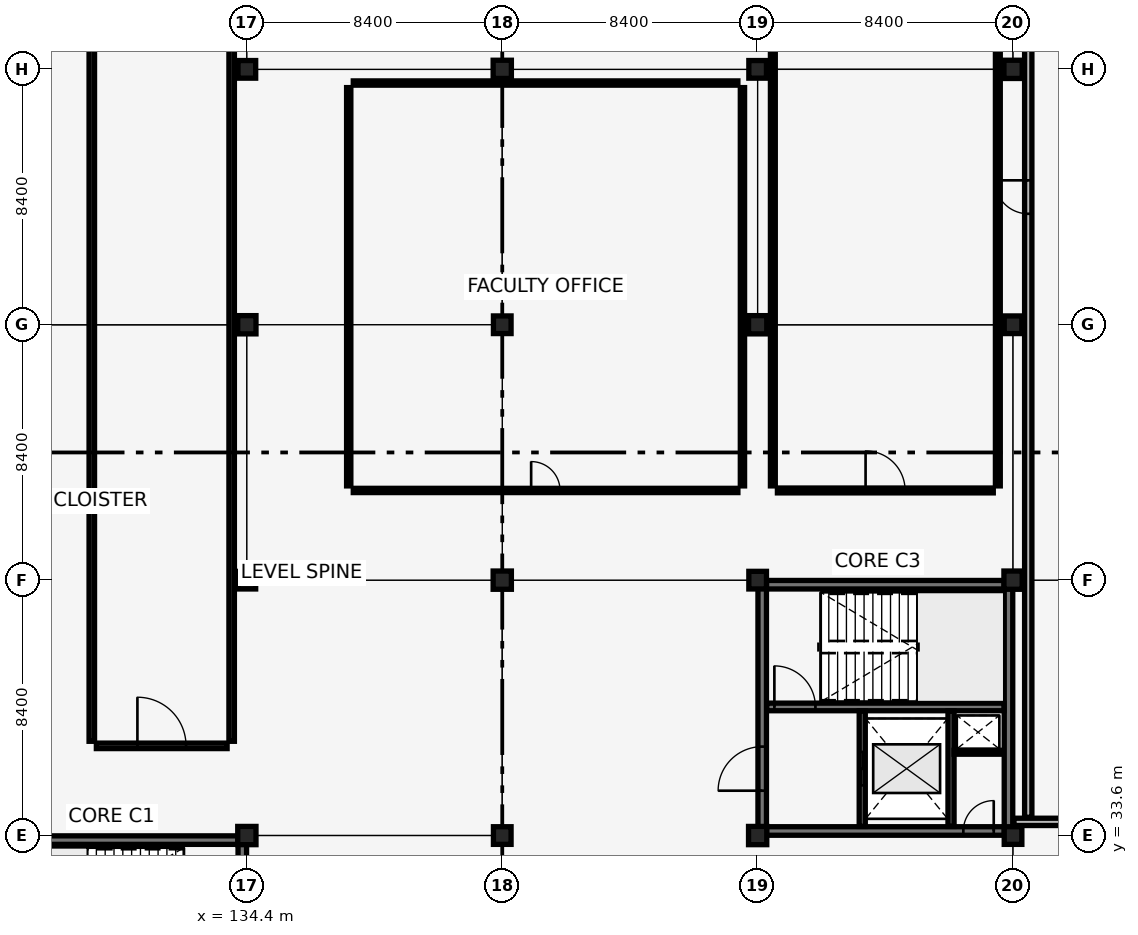
"""IFC4 building model, lengths in metres.
Left out: names, types, materials, properties, quantities, classifications, styles, units other than length and angle.
Written with IfcOpenShell. Run it as: python <this file> out.ifc"""

import sys

from ifc_helpers import new_model, si_unit, direction, frame, frame_2d, origin, origin_2d, place, context, subcontext, project, spatial, rectangle, extrude, element, fill, save


model = new_model("IFC4")
c1 = context("Model", 3, precision=1e-05, world=origin(), true_north=direction((0.0, 1.0)))
c2 = subcontext(c1, "Body", "Model", "MODEL_VIEW")
j1 = project(units=[si_unit("LENGTHUNIT", "METRE"), si_unit("PLANEANGLEUNIT", "RADIAN")], contexts=[c1])
p1 = place(None, origin())
s1 = spatial("IfcSite", under=j1, at=p1, CompositionType="ELEMENT")
p2 = place(p1, origin())
s2 = spatial("IfcBuilding", under=s1, at=p2, CompositionType="ELEMENT")
p3 = place(p2, frame((0.0, 0.0, 18.02)))
s3 = spatial("IfcBuildingStorey", under=s2, at=p3, CompositionType="ELEMENT", Elevation=18.02)
p4 = place(p3, frame((126.15, 33.45, 0.0), z_axis=(0.0, 0.0, 1.0), x_axis=(1.0, 0.0, 0.0)))
e1 = element("IfcWall", 1, at=p4, inside=s3, PredefinedType="SHEAR", context=c2, shape_type="SweptSolid", body=[
    extrude(rectangle(XDim=8.1, YDim=0.28, at=frame_2d((4.05, 0.0))), origin(), (0.0, 0.0, 1.0), 3.78),
])
p5 = place(p3, frame((134.25, 25.35, 0.0), z_axis=(0.0, 0.0, 1.0), x_axis=(0.0, 1.0, 0.0)))
e2 = element("IfcWall", 2, at=p5, inside=s3, PredefinedType="SHEAR", context=c2, shape_type="SweptSolid", body=[
    extrude(rectangle(XDim=8.1, YDim=0.28, at=frame_2d((4.05, 0.0))), origin(), (0.0, 0.0, 1.0), 3.78),
])
p6 = place(p5, frame((1.325, 0.0, 0.0)))
e3 = element("IfcOpeningElement", 3, at=p6, cuts=e2, PredefinedType="OPENING", context=c2, shape_type="SweptSolid", body=[
    extrude(rectangle(XDim=1.45, YDim=2.15, at=frame_2d((0.725, 1.075))), frame((0.0, 0.15, 0.0), z_axis=(0.0, -1.0, 0.0), x_axis=(1.0, 0.0, 0.0)), (0.0, 0.0, 1.0), 0.3),
])
p7 = place(p3, frame((151.35, 33.75, 0.0), z_axis=(0.0, 0.0, 1.0), x_axis=(1.0, 0.0, 0.0)))
e4 = element("IfcWall", 4, at=p7, inside=s3, PredefinedType="SHEAR", context=c2, shape_type="SweptSolid", body=[
    extrude(rectangle(XDim=8.1, YDim=0.28, at=frame_2d((4.05, 0.0))), origin(), (0.0, 0.0, 1.0), 3.78),
])
p8 = place(p7, frame((6.615, 0.0, 0.0)))
e5 = element("IfcOpeningElement", 5, at=p8, cuts=e4, PredefinedType="OPENING", context=c2, shape_type="SweptSolid", body=[
    extrude(rectangle(XDim=1.0, YDim=2.15, at=frame_2d((0.5, 1.075))), frame((0.0, 0.15, 0.0), z_axis=(0.0, -1.0, 0.0), x_axis=(1.0, 0.0, 0.0)), (0.0, 0.0, 1.0), 0.3),
])
p9 = place(p3, frame((151.35, 41.85, 0.0), z_axis=(0.0, 0.0, 1.0), x_axis=(1.0, 0.0, 0.0)))
e6 = element("IfcWall", 6, at=p9, inside=s3, PredefinedType="SHEAR", context=c2, shape_type="SweptSolid", body=[
    extrude(rectangle(XDim=8.1, YDim=0.28, at=frame_2d((4.05, 0.0))), origin(), (0.0, 0.0, 1.0), 3.78),
])
p10 = place(p3, frame((151.35, 33.75, 0.0), z_axis=(0.0, 0.0, 1.0), x_axis=(0.0, 1.0, 0.0)))
e7 = element("IfcWall", 7, at=p10, inside=s3, PredefinedType="SHEAR", context=c2, shape_type="SweptSolid", body=[
    extrude(rectangle(XDim=8.1, YDim=0.28, at=frame_2d((4.05, 0.0))), origin(), (0.0, 0.0, 1.0), 3.78),
])
p11 = place(p10, frame((1.325, 0.0, 0.0)))
e8 = element("IfcOpeningElement", 8, at=p11, cuts=e7, PredefinedType="OPENING", context=c2, shape_type="SweptSolid", body=[
    extrude(rectangle(XDim=1.45, YDim=2.15, at=frame_2d((0.725, 1.075))), frame((0.0, 0.15, 0.0), z_axis=(0.0, -1.0, 0.0), x_axis=(1.0, 0.0, 0.0)), (0.0, 0.0, 1.0), 0.3),
])
p12 = place(p3, frame((159.45, 33.75, 0.0), z_axis=(0.0, 0.0, 1.0), x_axis=(0.0, 1.0, 0.0)))
e9 = element("IfcWall", 9, at=p12, inside=s3, PredefinedType="SHEAR", context=c2, shape_type="SweptSolid", body=[
    extrude(rectangle(XDim=8.1, YDim=0.28, at=frame_2d((4.05, 0.0))), origin(), (0.0, 0.0, 1.0), 3.78),
])
p13 = place(p3, frame((151.5, 37.83, 0.0), z_axis=(0.0, 0.0, 1.0), x_axis=(1.0, 0.0, 0.0)))
e10 = element("IfcWall", 10, at=p13, inside=s3, PredefinedType="SHEAR", context=c2, shape_type="SweptSolid", body=[
    extrude(rectangle(XDim=7.8, YDim=0.25, at=frame_2d((3.9, 0.0))), origin(), (0.0, 0.0, 1.0), 3.78),
])
p14 = place(p13, frame((0.25, 0.0, 0.0)))
e11 = element("IfcOpeningElement", 11, at=p14, cuts=e10, PredefinedType="OPENING", context=c2, shape_type="SweptSolid", body=[
    extrude(rectangle(XDim=1.35, YDim=2.15, at=frame_2d((0.675, 1.075))), frame((0.0, 0.135, 0.0), z_axis=(0.0, -1.0, 0.0), x_axis=(1.0, 0.0, 0.0)), (0.0, 0.0, 1.0), 0.27),
])
p15 = place(p3, frame((134.4, 33.6, 0.0), z_axis=(0.0, 0.0, 1.0), x_axis=(1.0, 0.0, 0.0)))
e12 = element("IfcColumn", 12, at=p15, inside=s3, PredefinedType="COLUMN", context=c2, shape_type="SweptSolid", body=[
    extrude(rectangle(XDim=0.6, YDim=0.6, at=origin_2d()), origin(), (0.0, 0.0, 1.0), 3.78),
])
p16 = place(p3, frame((134.4, 42.0, 0.0), z_axis=(0.0, 0.0, 1.0), x_axis=(1.0, 0.0, 0.0)))
e13 = element("IfcColumn", 13, at=p16, inside=s3, PredefinedType="COLUMN", context=c2, shape_type="SweptSolid", body=[
    extrude(rectangle(XDim=0.58, YDim=0.58, at=origin_2d()), origin(), (0.0, 0.0, 1.0), 3.78),
])
p17 = place(p3, frame((134.4, 50.4, 0.0), z_axis=(0.0, 0.0, 1.0), x_axis=(1.0, 0.0, 0.0)))
e14 = element("IfcColumn", 14, at=p17, inside=s3, PredefinedType="COLUMN", context=c2, shape_type="SweptSolid", body=[
    extrude(rectangle(XDim=0.6, YDim=0.6, at=origin_2d()), origin(), (0.0, 0.0, 1.0), 3.78),
])
for number, where, z_axis, x_axis in (
    (15, (134.4, 58.8, 0.0), (0.0, 0.0, 1.0), (1.0, 0.0, 0.0)),
    (16, (142.8, 33.6, 0.0), (0.0, 0.0, 1.0), (1.0, 0.0, 0.0)),
):
    element("IfcColumn", number, at=place(p3, frame(where, z_axis=z_axis, x_axis=x_axis)), inside=s3, PredefinedType="COLUMN", context=c2, shape_type="SweptSolid", body=[
        extrude(rectangle(XDim=0.58, YDim=0.58, at=origin_2d()), origin(), (0.0, 0.0, 1.0), 3.78),
    ])
p18 = place(p3, frame((142.8, 42.0, 0.0), z_axis=(0.0, 0.0, 1.0), x_axis=(1.0, 0.0, 0.0)))
e17 = element("IfcColumn", 17, at=p18, inside=s3, PredefinedType="COLUMN", context=c2, shape_type="SweptSolid", body=[
    extrude(rectangle(XDim=0.6, YDim=0.6, at=origin_2d()), origin(), (0.0, 0.0, 1.0), 3.78),
])
p19 = place(p3, frame((142.8, 50.4, 0.0), z_axis=(0.0, 0.0, 1.0), x_axis=(1.0, 0.0, 0.0)))
e18 = element("IfcColumn", 18, at=p19, inside=s3, PredefinedType="COLUMN", context=c2, shape_type="SweptSolid", body=[
    extrude(rectangle(XDim=0.58, YDim=0.58, at=origin_2d()), origin(), (0.0, 0.0, 1.0), 3.78),
])
for number, where, z_axis, x_axis in (
    (19, (142.8, 58.8, 0.0), (0.0, 0.0, 1.0), (1.0, 0.0, 0.0)),
    (20, (151.2, 33.6, 0.0), (0.0, 0.0, 1.0), (1.0, 0.0, 0.0)),
):
    element("IfcColumn", number, at=place(p3, frame(where, z_axis=z_axis, x_axis=x_axis)), inside=s3, PredefinedType="COLUMN", context=c2, shape_type="SweptSolid", body=[
        extrude(rectangle(XDim=0.6, YDim=0.6, at=origin_2d()), origin(), (0.0, 0.0, 1.0), 3.78),
    ])
p20 = place(p3, frame((151.2, 42.0, 0.0), z_axis=(0.0, 0.0, 1.0), x_axis=(1.0, 0.0, 0.0)))
e21 = element("IfcColumn", 21, at=p20, inside=s3, PredefinedType="COLUMN", context=c2, shape_type="SweptSolid", body=[
    extrude(rectangle(XDim=0.58, YDim=0.58, at=origin_2d()), origin(), (0.0, 0.0, 1.0), 3.78),
])
p21 = place(p3, frame((151.2, 50.4, 0.0), z_axis=(0.0, 0.0, 1.0), x_axis=(1.0, 0.0, 0.0)))
e22 = element("IfcColumn", 22, at=p21, inside=s3, PredefinedType="COLUMN", context=c2, shape_type="SweptSolid", body=[
    extrude(rectangle(XDim=0.6, YDim=0.6, at=origin_2d()), origin(), (0.0, 0.0, 1.0), 3.78),
])
for number, where, z_axis, x_axis in (
    (23, (151.2, 58.8, 0.0), (0.0, 0.0, 1.0), (1.0, 0.0, 0.0)),
    (24, (159.6, 33.6, 0.0), (0.0, 0.0, 1.0), (1.0, 0.0, 0.0)),
):
    element("IfcColumn", number, at=place(p3, frame(where, z_axis=z_axis, x_axis=x_axis)), inside=s3, PredefinedType="COLUMN", context=c2, shape_type="SweptSolid", body=[
        extrude(rectangle(XDim=0.58, YDim=0.58, at=origin_2d()), origin(), (0.0, 0.0, 1.0), 3.78),
    ])
p22 = place(p3, frame((159.6, 42.0, 0.0), z_axis=(0.0, 0.0, 1.0), x_axis=(1.0, 0.0, 0.0)))
e25 = element("IfcColumn", 25, at=p22, inside=s3, PredefinedType="COLUMN", context=c2, shape_type="SweptSolid", body=[
    extrude(rectangle(XDim=0.6, YDim=0.6, at=origin_2d()), origin(), (0.0, 0.0, 1.0), 3.78),
])
p23 = place(p3, frame((159.6, 50.4, 0.0), z_axis=(0.0, 0.0, 1.0), x_axis=(1.0, 0.0, 0.0)))
e26 = element("IfcColumn", 26, at=p23, inside=s3, PredefinedType="COLUMN", context=c2, shape_type="SweptSolid", body=[
    extrude(rectangle(XDim=0.58, YDim=0.58, at=origin_2d()), origin(), (0.0, 0.0, 1.0), 3.78),
])
p24 = place(p3, frame((159.6, 58.8, 0.0), z_axis=(0.0, 0.0, 1.0), x_axis=(1.0, 0.0, 0.0)))
e27 = element("IfcColumn", 27, at=p24, inside=s3, PredefinedType="COLUMN", context=c2, shape_type="SweptSolid", body=[
    extrude(rectangle(XDim=0.6, YDim=0.6, at=origin_2d()), origin(), (0.0, 0.0, 1.0), 3.78),
])
p25 = place(p3, frame((154.64, 33.9, 0.0), z_axis=(0.0, 0.0, 1.0), x_axis=(0.0, 1.0, 0.0)))
e28 = element("IfcWall", 28, at=p25, inside=s3, PredefinedType="SHEAR", context=c2, shape_type="SweptSolid", body=[
    extrude(rectangle(XDim=3.8, YDim=0.2, at=frame_2d((1.9, 0.0))), origin(), (0.0, 0.0, 1.0), 3.08),
])
p26 = place(p25, frame((1.35, 0.0, 0.0)))
e29 = element("IfcOpeningElement", 29, at=p26, cuts=e28, PredefinedType="OPENING", context=c2, shape_type="SweptSolid", body=[
    extrude(rectangle(XDim=1.1, YDim=2.15, at=frame_2d((0.55, 1.075))), frame((0.0, 0.11, 0.0), z_axis=(0.0, -1.0, 0.0), x_axis=(1.0, 0.0, 0.0)), (0.0, 0.0, 1.0), 0.22),
])
p27 = place(p3, frame((157.56, 33.9, 0.0), z_axis=(0.0, 0.0, 1.0), x_axis=(0.0, 1.0, 0.0)))
e30 = element("IfcWall", 30, at=p27, inside=s3, PredefinedType="SHEAR", context=c2, shape_type="SweptSolid", body=[
    extrude(rectangle(XDim=3.8, YDim=0.2, at=frame_2d((1.9, 0.0))), origin(), (0.0, 0.0, 1.0), 3.08),
])
p28 = place(p3, frame((157.66, 36.34, 0.0), z_axis=(0.0, 0.0, 1.0), x_axis=(1.0, 0.0, 0.0)))
e31 = element("IfcWall", 31, at=p28, inside=s3, PredefinedType="PARTITIONING", context=c2, shape_type="SweptSolid", body=[
    extrude(rectangle(XDim=1.62, YDim=0.13, at=frame_2d((0.81, 0.0))), origin(), (0.0, 0.0, 1.0), 3.78),
])
p29 = place(p3, frame((160.1, 34.2, 0.0), z_axis=(0.0, 0.0, 1.0), x_axis=(0.0, 1.0, 0.0)))
e32 = element("IfcWall", 32, at=p29, inside=s3, PredefinedType="PARTITIONING", context=c2, shape_type="SweptSolid", body=[
    extrude(rectangle(XDim=40.8, YDim=0.24, at=frame_2d((20.4, 0.0))), origin(), (0.0, 0.0, 1.0), 3.08),
])
p30 = place(p29, frame((19.85, 0.0, 0.0)))
e33 = element("IfcOpeningElement", 33, at=p30, cuts=e32, PredefinedType="OPENING", context=c2, shape_type="SweptSolid", body=[
    extrude(rectangle(XDim=1.1, YDim=2.15, at=frame_2d((0.55, 1.075))), frame((0.0, 0.13, 0.0), z_axis=(0.0, -1.0, 0.0), x_axis=(1.0, 0.0, 0.0)), (0.0, 0.0, 1.0), 0.26),
])
p31 = place(p3, frame((159.63, 34.05, 0.0), z_axis=(0.0, 0.0, 1.0), x_axis=(1.0, 0.0, 0.0)))
e34 = element("IfcWall", 34, at=p31, inside=s3, PredefinedType="PARTITIONING", context=c2, shape_type="SweptSolid", body=[
    extrude(rectangle(XDim=8.19, YDim=0.24, at=frame_2d((4.095, 0.0))), origin(), (0.0, 0.0, 1.0), 3.18),
])
p32 = place(p3, frame((129.45, 36.55, 0.0), z_axis=(0.0, 0.0, 1.0), x_axis=(1.0, 0.0, 0.0)))
e35 = element("IfcWall", 35, at=p32, inside=s3, PredefinedType="PARTITIONING", context=c2, shape_type="SweptSolid", body=[
    extrude(rectangle(XDim=4.3, YDim=0.18, at=frame_2d((2.15, 0.0))), origin(), (0.0, 0.0, 1.0), 3.78),
])
p33 = place(p32, frame((1.35, 0.0, 0.0)))
e36 = element("IfcOpeningElement", 36, at=p33, cuts=e35, PredefinedType="OPENING", context=c2, shape_type="SweptSolid", body=[
    extrude(rectangle(XDim=1.6, YDim=2.25, at=frame_2d((0.8, 1.125))), frame((0.0, 0.1, 0.0), z_axis=(0.0, -1.0, 0.0), x_axis=(1.0, 0.0, 0.0)), (0.0, 0.0, 1.0), 0.2),
])
for number, where, z_axis, x_axis in (
    (37, (129.3, 36.7, 0.0), (0.0, 0.0, 1.0), (0.0, 1.0, 0.0)),
    (38, (133.9, 36.7, 0.0), (0.0, 0.0, 1.0), (0.0, 1.0, 0.0)),
):
    element("IfcWall", number, at=place(p3, frame(where, z_axis=z_axis, x_axis=x_axis)), inside=s3, PredefinedType="PARTITIONING", context=c2, shape_type="SweptSolid", body=[
        extrude(rectangle(XDim=47.27, YDim=0.18, at=frame_2d((23.635, 0.0))), origin(), (0.0, 0.0, 1.0), 3.08),
    ])
p34 = place(p3, frame((137.9, 44.95, 0.0), z_axis=(0.0, 0.0, 1.0), x_axis=(1.0, 0.0, 0.0)))
e39 = element("IfcWall", 39, at=p34, inside=s3, PredefinedType="PARTITIONING", context=c2, shape_type="SweptSolid", body=[
    extrude(rectangle(XDim=12.65, YDim=0.14, at=frame_2d((6.325, 0.0))), origin(), (0.0, 0.0, 1.0), 3.38),
])
p35 = place(p34, frame((5.85, 0.0, 0.0)))
e40 = element("IfcOpeningElement", 40, at=p35, cuts=e39, PredefinedType="OPENING", context=c2, shape_type="SweptSolid", body=[
    extrude(rectangle(XDim=0.95, YDim=2.1, at=frame_2d((0.475, 1.05))), frame((0.0, 0.08, 0.0), z_axis=(0.0, -1.0, 0.0), x_axis=(1.0, 0.0, 0.0)), (0.0, 0.0, 1.0), 0.16),
])
p36 = place(p3, frame((137.75, 45.1, 0.0), z_axis=(0.0, 0.0, 1.0), x_axis=(0.0, 1.0, 0.0)))
e41 = element("IfcWall", 41, at=p36, inside=s3, PredefinedType="PARTITIONING", context=c2, shape_type="SweptSolid", body=[
    extrude(rectangle(XDim=13.1, YDim=0.14, at=frame_2d((6.55, 0.0))), origin(), (0.0, 0.0, 1.0), 3.08),
])
p37 = place(p3, frame((137.9, 58.35, 0.0), z_axis=(0.0, 0.0, 1.0), x_axis=(1.0, 0.0, 0.0)))
e42 = element("IfcWall", 42, at=p37, inside=s3, PredefinedType="PARTITIONING", context=c2, shape_type="SweptSolid", body=[
    extrude(rectangle(XDim=12.65, YDim=0.14, at=frame_2d((6.325, 0.0))), origin(), (0.0, 0.0, 1.0), 3.38),
])
p38 = place(p3, frame((150.7, 45.1, 0.0), z_axis=(0.0, 0.0, 1.0), x_axis=(0.0, 1.0, 0.0)))
e43 = element("IfcWall", 43, at=p38, inside=s3, PredefinedType="PARTITIONING", context=c2, shape_type="SweptSolid", body=[
    extrude(rectangle(XDim=13.1, YDim=0.14, at=frame_2d((6.55, 0.0))), origin(), (0.0, 0.0, 1.0), 3.08),
])
p39 = place(p3, frame((151.85, 44.95, 0.0), z_axis=(0.0, 0.0, 1.0), x_axis=(1.0, 0.0, 0.0)))
e44 = element("IfcWall", 44, at=p39, inside=s3, PredefinedType="PARTITIONING", context=c2, shape_type="SweptSolid", body=[
    extrude(rectangle(XDim=7.1, YDim=0.16, at=frame_2d((3.55, 0.0))), origin(), (0.0, 0.0, 1.0), 3.78),
])
p40 = place(p39, frame((2.9, 0.0, 0.0)))
e45 = element("IfcOpeningElement", 45, at=p40, cuts=e44, PredefinedType="OPENING", context=c2, shape_type="SweptSolid", body=[
    extrude(rectangle(XDim=1.3, YDim=2.2, at=frame_2d((0.65, 1.1))), frame((0.0, 0.09, 0.0), z_axis=(0.0, -1.0, 0.0), x_axis=(1.0, 0.0, 0.0)), (0.0, 0.0, 1.0), 0.18),
])
for number, where, z_axis, x_axis in (
    (46, (151.7, 45.1, 0.0), (0.0, 0.0, 1.0), (0.0, 1.0, 0.0)),
    (47, (159.1, 45.1, 0.0), (0.0, 0.0, 1.0), (0.0, 1.0, 0.0)),
):
    element("IfcWall", number, at=place(p3, frame(where, z_axis=z_axis, x_axis=x_axis)), inside=s3, PredefinedType="PARTITIONING", context=c2, shape_type="SweptSolid", body=[
        extrude(rectangle(XDim=30.47, YDim=0.16, at=frame_2d((15.235, 0.0))), origin(), (0.0, 0.0, 1.0), 3.08),
    ])
p41 = place(p14, origin())
e48 = element("IfcDoor", 48, at=p41, inside=s3, OperationType="SINGLE_SWING_LEFT", PredefinedType="DOOR", context=c2, shape_type="SweptSolid", body=[
    extrude(rectangle(XDim=1.35, YDim=2.15, at=frame_2d((0.675, 1.075))), frame((0.0, 0.025, 0.0), z_axis=(0.0, -1.0, 0.0), x_axis=(1.0, 0.0, 0.0)), (0.0, 0.0, 1.0), 0.05),
])
fill(e11, e48)
p42 = place(p26, origin())
e49 = element("IfcDoor", 49, at=p42, inside=s3, OperationType="SLIDING_TO_LEFT", PredefinedType="DOOR", context=c2, shape_type="SweptSolid", body=[
    extrude(rectangle(XDim=1.1, YDim=2.15, at=frame_2d((0.55, 1.075))), frame((0.0, 0.025, 0.0), z_axis=(0.0, -1.0, 0.0), x_axis=(1.0, 0.0, 0.0)), (0.0, 0.0, 1.0), 0.05),
])
fill(e29, e49)
p43 = place(p11, origin())
e50 = element("IfcDoor", 50, at=p43, inside=s3, OperationType="DOUBLE_DOOR_SINGLE_SWING", PredefinedType="DOOR", context=c2, shape_type="SweptSolid", body=[
    extrude(rectangle(XDim=1.45, YDim=2.15, at=frame_2d((0.725, 1.075))), frame((0.0, 0.025, 0.0), z_axis=(0.0, -1.0, 0.0), x_axis=(1.0, 0.0, 0.0)), (0.0, 0.0, 1.0), 0.05),
])
fill(e8, e50)
p44 = place(p8, origin())
e51 = element("IfcDoor", 51, at=p44, inside=s3, OperationType="SINGLE_SWING_RIGHT", PredefinedType="DOOR", context=c2, shape_type="SweptSolid", body=[
    extrude(rectangle(XDim=1.0, YDim=2.15, at=frame_2d((0.5, 1.075))), frame((0.0, 0.025, 0.0), z_axis=(0.0, -1.0, 0.0), x_axis=(1.0, 0.0, 0.0)), (0.0, 0.0, 1.0), 0.05),
])
fill(e5, e51)
p45 = place(p30, origin())
e52 = element("IfcDoor", 52, at=p45, inside=s3, OperationType="SINGLE_SWING_RIGHT", PredefinedType="DOOR", context=c2, shape_type="SweptSolid", body=[
    extrude(rectangle(XDim=1.1, YDim=2.15, at=frame_2d((0.55, 1.075))), frame((0.0, 0.025, 0.0), z_axis=(0.0, -1.0, 0.0), x_axis=(1.0, 0.0, 0.0)), (0.0, 0.0, 1.0), 0.05),
])
fill(e33, e52)
p46 = place(p33, origin())
e53 = element("IfcDoor", 53, at=p46, inside=s3, OperationType="DOUBLE_DOOR_SINGLE_SWING", PredefinedType="DOOR", context=c2, shape_type="SweptSolid", body=[
    extrude(rectangle(XDim=1.6, YDim=2.25, at=frame_2d((0.8, 1.125))), frame((0.0, 0.025, 0.0), z_axis=(0.0, -1.0, 0.0), x_axis=(1.0, 0.0, 0.0)), (0.0, 0.0, 1.0), 0.05),
])
fill(e36, e53)
p47 = place(p35, origin())
e54 = element("IfcDoor", 54, at=p47, inside=s3, OperationType="SINGLE_SWING_LEFT", PredefinedType="DOOR", context=c2, shape_type="SweptSolid", body=[
    extrude(rectangle(XDim=0.95, YDim=2.1, at=frame_2d((0.475, 1.05))), frame((0.0, 0.025, 0.0), z_axis=(0.0, -1.0, 0.0), x_axis=(1.0, 0.0, 0.0)), (0.0, 0.0, 1.0), 0.05),
])
fill(e40, e54)
p48 = place(p40, origin())
e55 = element("IfcDoor", 55, at=p48, inside=s3, OperationType="SINGLE_SWING_LEFT", PredefinedType="DOOR", context=c2, shape_type="SweptSolid", body=[
    extrude(rectangle(XDim=1.3, YDim=2.2, at=frame_2d((0.65, 1.1))), frame((0.0, 0.025, 0.0), z_axis=(0.0, -1.0, 0.0), x_axis=(1.0, 0.0, 0.0)), (0.0, 0.0, 1.0), 0.05),
])
fill(e45, e55)
save(model, sys.argv[1])
